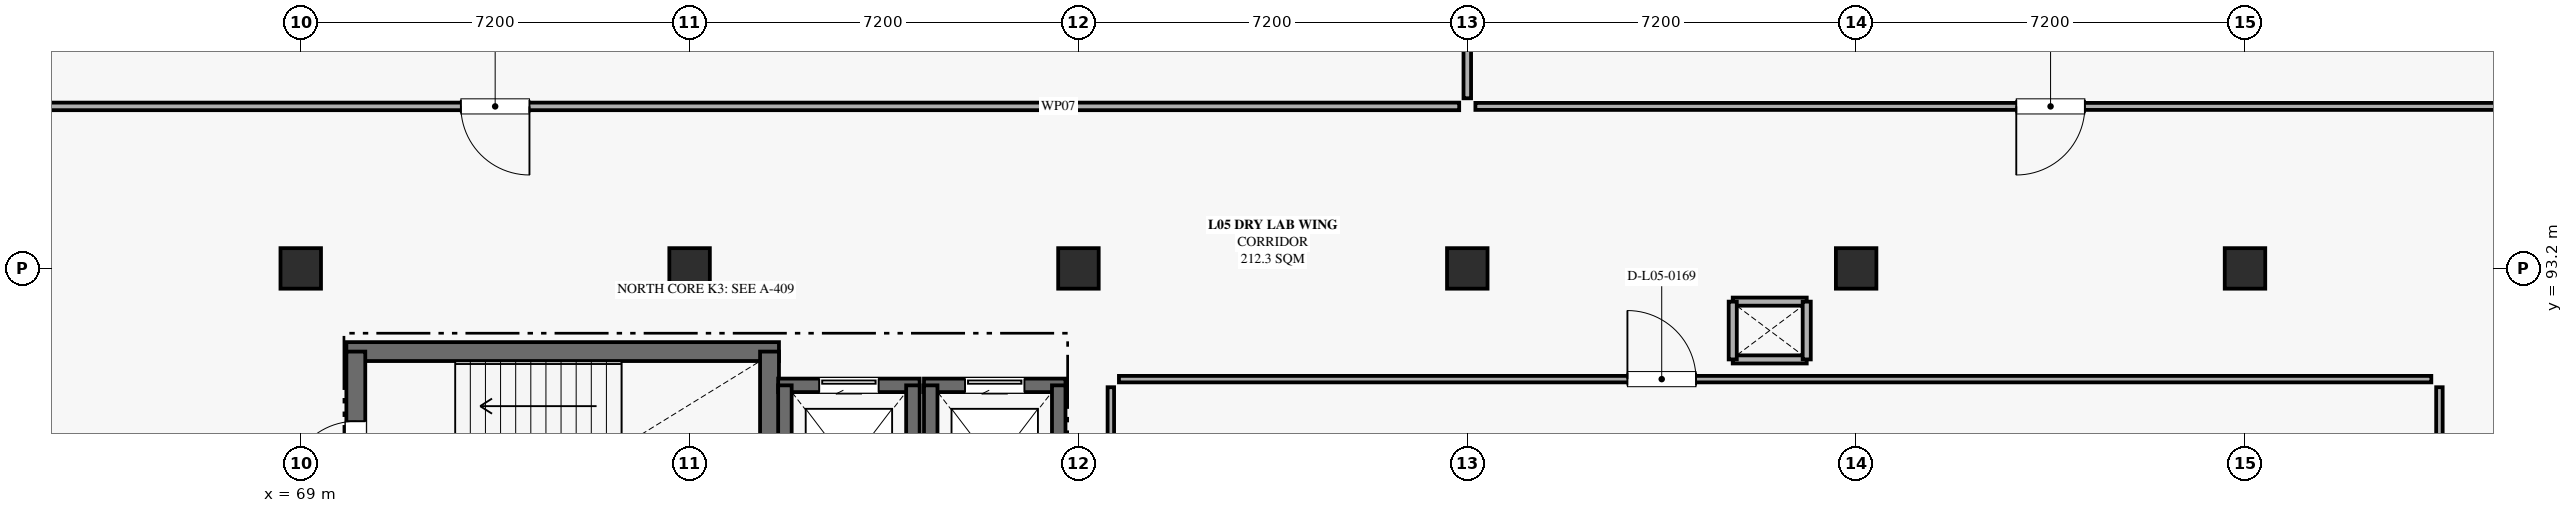
"""IFC4 building model, lengths in metres.
Left out: names, types, materials, properties, quantities, classifications, styles, units other than length and angle.
Written with IfcOpenShell. Run it as: python <this file> out.ifc"""

import sys

from ifc_helpers import new_model, si_unit, direction, frame, frame_2d, origin, origin_2d, place, context, subcontext, project, spatial, rectangle, extrude, element, fill, save


model = new_model("IFC4")
c1 = context("Model", 3, precision=1e-05, world=origin(), true_north=direction((0.0, 1.0)))
c2 = subcontext(c1, "Body", "Model", "MODEL_VIEW")
j1 = project(units=[si_unit("LENGTHUNIT", "METRE"), si_unit("PLANEANGLEUNIT", "RADIAN")], contexts=[c1])
p1 = place(None, origin())
s1 = spatial("IfcSite", under=j1, at=p1, CompositionType="ELEMENT")
p2 = place(p1, origin())
s2 = spatial("IfcBuilding", under=s1, at=p2, CompositionType="ELEMENT")
p3 = place(p2, frame((0.0, 0.0, 24.3)))
s3 = spatial("IfcBuildingStorey", under=s2, at=p3, CompositionType="ELEMENT", Elevation=24.3)
for number, where, z_axis, x_axis in (
    (1, (69.0, 93.2, 0.0), (0.0, 0.0, 1.0), (1.0, 0.0, 0.0)),
    (2, (76.2, 93.2, 0.0), (0.0, 0.0, 1.0), (1.0, 0.0, 0.0)),
    (3, (83.4, 93.2, 0.0), (0.0, 0.0, 1.0), (1.0, 0.0, 0.0)),
    (4, (90.6, 93.2, 0.0), (0.0, 0.0, 1.0), (1.0, 0.0, 0.0)),
    (5, (97.8, 93.2, 0.0), (0.0, 0.0, 1.0), (1.0, 0.0, 0.0)),
    (6, (105.0, 93.2, 0.0), (0.0, 0.0, 1.0), (1.0, 0.0, 0.0)),
):
    element("IfcColumn", number, at=place(p3, frame(where, z_axis=z_axis, x_axis=x_axis)), inside=s3, PredefinedType="COLUMN", context=c2, shape_type="SweptSolid", body=[
        extrude(rectangle(XDim=0.75, YDim=0.75, at=origin_2d()), origin(), (0.0, 0.0, 1.0), 4.5),
    ])
p4 = place(p3, frame((69.845, 91.66, 0.0), z_axis=(0.0, 0.0, 1.0), x_axis=(1.0, 0.0, 0.0)))
e7 = element("IfcWall", 7, at=p4, inside=s3, PredefinedType="SHEAR", context=c2, shape_type="SweptSolid", body=[
    extrude(rectangle(XDim=8.01, YDim=0.35, at=frame_2d((4.005, 0.0))), origin(), (0.0, 0.0, 1.0), 4.23),
])
p5 = place(p3, frame((70.02, 87.82, 0.0), z_axis=(0.0, 0.0, 1.0), x_axis=(0.0, 1.0, 0.0)))
e8 = element("IfcWall", 8, at=p5, inside=s3, PredefinedType="SHEAR", context=c2, shape_type="SweptSolid", body=[
    extrude(rectangle(XDim=3.84, YDim=0.35, at=frame_2d((1.92, 0.0))), origin(), (0.0, 0.0, 1.0), 4.23),
])
p6 = place(p5, frame((1.29, 0.0, 0.0)))
e9 = element("IfcOpeningElement", 9, at=p6, cuts=e8, PredefinedType="OPENING", context=c2, shape_type="SweptSolid", body=[
    extrude(rectangle(XDim=1.26, YDim=2.18, at=frame_2d((0.63, 1.09))), frame((0.0, 0.185, 0.0), z_axis=(0.0, -1.0, 0.0), x_axis=(1.0, 0.0, 0.0)), (0.0, 0.0, 1.0), 0.37),
])
p7 = place(p3, frame((77.68, 91.66, 0.0), z_axis=(0.0, 0.0, 1.0), x_axis=(0.0, -1.0, 0.0)))
e10 = element("IfcWall", 10, at=p7, inside=s3, PredefinedType="SHEAR", context=c2, shape_type="SweptSolid", body=[
    extrude(rectangle(XDim=3.84, YDim=0.35, at=frame_2d((1.92, 0.0))), origin(), (0.0, 0.0, 1.0), 4.23),
])
for number, where, z_axis, x_axis in (
    (11, (96.885, 91.515, 0.0), (0.0, 0.0, 1.0), (-1.0, 0.0, 0.0)),
    (12, (95.515, 92.585, 0.0), (0.0, 0.0, 1.0), (1.0, 0.0, 0.0)),
):
    element("IfcWall", number, at=place(p3, frame(where, z_axis=z_axis, x_axis=x_axis)), inside=s3, PredefinedType="PARTITIONING", context=c2, shape_type="SweptSolid", body=[
        extrude(rectangle(XDim=1.37, YDim=0.15, at=frame_2d((0.685, 0.0))), origin(), (0.0, 0.0, 1.0), 2.98),
    ])
for number, where, z_axis, x_axis in (
    (13, (95.515, 91.515, 0.0), (0.0, 0.0, 1.0), (0.0, 1.0, 0.0)),
    (14, (96.885, 92.585, 0.0), (0.0, 0.0, 1.0), (0.0, -1.0, 0.0)),
):
    element("IfcWall", number, at=place(p3, frame(where, z_axis=z_axis, x_axis=x_axis)), inside=s3, PredefinedType="PARTITIONING", context=c2, shape_type="SweptSolid", body=[
        extrude(rectangle(XDim=1.07, YDim=0.15, at=frame_2d((0.535, 0.0))), origin(), (0.0, 0.0, 1.0), 2.98),
    ])
p8 = place(p3, frame((77.84, 91.035, 0.0), z_axis=(0.0, 0.0, 1.0), x_axis=(1.0, 0.0, 0.0)))
e15 = element("IfcWall", 15, at=p8, inside=s3, PredefinedType="SHEAR", context=c2, shape_type="SweptSolid", body=[
    extrude(rectangle(XDim=2.62, YDim=0.25, at=frame_2d((1.31, 0.0))), origin(), (0.0, 0.0, 1.0), 4.23),
])
p9 = place(p8, frame((0.76, 0.0, 0.0)))
e16 = element("IfcOpeningElement", 16, at=p9, cuts=e15, PredefinedType="OPENING", context=c2, shape_type="SweptSolid", body=[
    extrude(rectangle(XDim=1.1, YDim=2.2, at=frame_2d((0.55, 1.1))), frame((0.0, 0.135, 0.0), z_axis=(0.0, -1.0, 0.0), x_axis=(1.0, 0.0, 0.0)), (0.0, 0.0, 1.0), 0.27),
])
for number, where, z_axis, x_axis in (
    (17, (77.965, 88.065, 0.0), (0.0, 0.0, 1.0), (0.0, 1.0, 0.0)),
    (18, (80.335, 91.035, 0.0), (0.0, 0.0, 1.0), (0.0, -1.0, 0.0)),
):
    element("IfcWall", number, at=place(p3, frame(where, z_axis=z_axis, x_axis=x_axis)), inside=s3, PredefinedType="SHEAR", context=c2, shape_type="SweptSolid", body=[
        extrude(rectangle(XDim=2.97, YDim=0.25, at=frame_2d((1.485, 0.0))), origin(), (0.0, 0.0, 1.0), 4.23),
    ])
p10 = place(p3, frame((80.54, 91.035, 0.0), z_axis=(0.0, 0.0, 1.0), x_axis=(1.0, 0.0, 0.0)))
e19 = element("IfcWall", 19, at=p10, inside=s3, PredefinedType="SHEAR", context=c2, shape_type="SweptSolid", body=[
    extrude(rectangle(XDim=2.62, YDim=0.25, at=frame_2d((1.31, 0.0))), origin(), (0.0, 0.0, 1.0), 4.23),
])
p11 = place(p10, frame((0.76, 0.0, 0.0)))
e20 = element("IfcOpeningElement", 20, at=p11, cuts=e19, PredefinedType="OPENING", context=c2, shape_type="SweptSolid", body=[
    extrude(rectangle(XDim=1.1, YDim=2.2, at=frame_2d((0.55, 1.1))), frame((0.0, 0.135, 0.0), z_axis=(0.0, -1.0, 0.0), x_axis=(1.0, 0.0, 0.0)), (0.0, 0.0, 1.0), 0.27),
])
for number, where, z_axis, x_axis in (
    (21, (80.665, 88.065, 0.0), (0.0, 0.0, 1.0), (0.0, 1.0, 0.0)),
    (22, (83.035, 91.035, 0.0), (0.0, 0.0, 1.0), (0.0, -1.0, 0.0)),
):
    element("IfcWall", number, at=place(p3, frame(where, z_axis=z_axis, x_axis=x_axis)), inside=s3, PredefinedType="SHEAR", context=c2, shape_type="SweptSolid", body=[
        extrude(rectangle(XDim=2.97, YDim=0.25, at=frame_2d((1.485, 0.0))), origin(), (0.0, 0.0, 1.0), 4.23),
    ])
p12 = place(p3, frame((90.45, 96.2, 0.0), z_axis=(0.0, 0.0, 1.0), x_axis=(-1.0, 0.0, 0.0)))
e23 = element("IfcWall", 23, at=p12, inside=s3, PredefinedType="PARTITIONING", context=c2, shape_type="SweptSolid", body=[
    extrude(rectangle(XDim=28.3, YDim=0.14, at=frame_2d((14.15, 0.0))), origin(), (0.0, 0.0, 1.0), 2.98),
])
p13 = place(p12, frame((17.215, 0.0, 0.0)))
e24 = element("IfcOpeningElement", 24, at=p13, cuts=e23, PredefinedType="OPENING", context=c2, shape_type="SweptSolid", body=[
    extrude(rectangle(XDim=1.27, YDim=2.05, at=frame_2d((0.635, 1.025))), frame((0.0, 0.08, 0.0), z_axis=(0.0, -1.0, 0.0), x_axis=(1.0, 0.0, 0.0)), (0.0, 0.0, 1.0), 0.16),
])
p14 = place(p3, frame((90.6, 107.45, 0.0), z_axis=(0.0, 0.0, 1.0), x_axis=(0.0, -1.0, 0.0)))
e25 = element("IfcWall", 25, at=p14, inside=s3, PredefinedType="PARTITIONING", context=c2, shape_type="SweptSolid", body=[
    extrude(rectangle(XDim=11.1, YDim=0.14, at=frame_2d((5.55, 0.0))), origin(), (0.0, 0.0, 1.0), 2.98),
])
p15 = place(p3, frame((111.85, 96.2, 0.0), z_axis=(0.0, 0.0, 1.0), x_axis=(-1.0, 0.0, 0.0)))
e26 = element("IfcWall", 26, at=p15, inside=s3, PredefinedType="PARTITIONING", context=c2, shape_type="SweptSolid", body=[
    extrude(rectangle(XDim=21.1, YDim=0.13, at=frame_2d((10.55, 0.0))), origin(), (0.0, 0.0, 1.0), 2.98),
])
p16 = place(p15, frame((9.815, 0.0, 0.0)))
e27 = element("IfcOpeningElement", 27, at=p16, cuts=e26, PredefinedType="OPENING", context=c2, shape_type="SweptSolid", body=[
    extrude(rectangle(XDim=1.27, YDim=2.1, at=frame_2d((0.635, 1.05))), frame((0.0, 0.075, 0.0), z_axis=(0.0, -1.0, 0.0), x_axis=(1.0, 0.0, 0.0)), (0.0, 0.0, 1.0), 0.15),
])
p17 = place(p3, frame((84.15, 91.15, 0.0), z_axis=(0.0, 0.0, 1.0), x_axis=(1.0, 0.0, 0.0)))
e28 = element("IfcWall", 28, at=p17, inside=s3, PredefinedType="PARTITIONING", context=c2, shape_type="SweptSolid", body=[
    extrude(rectangle(XDim=24.3, YDim=0.12, at=frame_2d((12.15, 0.0))), origin(), (0.0, 0.0, 1.0), 2.98),
])
p18 = place(p17, frame((9.415, 0.0, 0.0)))
e29 = element("IfcOpeningElement", 29, at=p18, cuts=e28, PredefinedType="OPENING", context=c2, shape_type="SweptSolid", body=[
    extrude(rectangle(XDim=1.27, YDim=2.16, at=frame_2d((0.635, 1.08))), frame((0.0, 0.07, 0.0), z_axis=(0.0, -1.0, 0.0), x_axis=(1.0, 0.0, 0.0)), (0.0, 0.0, 1.0), 0.14),
])
for number, where, z_axis, x_axis in (
    (30, (84.0, 86.35, 0.0), (0.0, 0.0, 1.0), (0.0, 1.0, 0.0)),
    (31, (108.6, 91.0, 0.0), (0.0, 0.0, 1.0), (0.0, -1.0, 0.0)),
):
    element("IfcWall", number, at=place(p3, frame(where, z_axis=z_axis, x_axis=x_axis)), inside=s3, PredefinedType="PARTITIONING", context=c2, shape_type="SweptSolid", body=[
        extrude(rectangle(XDim=4.65, YDim=0.12, at=frame_2d((2.325, 0.0))), origin(), (0.0, 0.0, 1.0), 2.98),
    ])
p19 = place(p6, origin())
e32 = element("IfcDoor", 32, at=p19, inside=s3, OperationType="SINGLE_SWING_LEFT", PredefinedType="DOOR", context=c2, shape_type="SweptSolid", body=[
    extrude(rectangle(XDim=1.26, YDim=2.18, at=frame_2d((0.63, 1.09))), frame((0.0, 0.025, 0.0), z_axis=(0.0, -1.0, 0.0), x_axis=(1.0, 0.0, 0.0)), (0.0, 0.0, 1.0), 0.05),
])
fill(e9, e32)
p20 = place(p9, origin())
e33 = element("IfcDoor", 33, at=p20, inside=s3, OperationType="SLIDING_TO_LEFT", PredefinedType="DOOR", context=c2, shape_type="SweptSolid", body=[
    extrude(rectangle(XDim=1.1, YDim=2.2, at=frame_2d((0.55, 1.1))), frame((0.0, 0.025, 0.0), z_axis=(0.0, -1.0, 0.0), x_axis=(1.0, 0.0, 0.0)), (0.0, 0.0, 1.0), 0.05),
])
fill(e16, e33)
p21 = place(p11, origin())
e34 = element("IfcDoor", 34, at=p21, inside=s3, OperationType="SLIDING_TO_LEFT", PredefinedType="DOOR", context=c2, shape_type="SweptSolid", body=[
    extrude(rectangle(XDim=1.1, YDim=2.2, at=frame_2d((0.55, 1.1))), frame((0.0, 0.025, 0.0), z_axis=(0.0, -1.0, 0.0), x_axis=(1.0, 0.0, 0.0)), (0.0, 0.0, 1.0), 0.05),
])
fill(e20, e34)
p22 = place(p13, origin())
e35 = element("IfcDoor", 35, at=p22, inside=s3, OperationType="SINGLE_SWING_LEFT", PredefinedType="DOOR", context=c2, shape_type="SweptSolid", body=[
    extrude(rectangle(XDim=1.27, YDim=2.05, at=frame_2d((0.635, 1.025))), frame((0.0, 0.025, 0.0), z_axis=(0.0, -1.0, 0.0), x_axis=(1.0, 0.0, 0.0)), (0.0, 0.0, 1.0), 0.05),
])
fill(e24, e35)
p23 = place(p16, origin())
e36 = element("IfcDoor", 36, at=p23, inside=s3, OperationType="SINGLE_SWING_RIGHT", PredefinedType="DOOR", context=c2, shape_type="SweptSolid", body=[
    extrude(rectangle(XDim=1.27, YDim=2.1, at=frame_2d((0.635, 1.05))), frame((0.0, 0.025, 0.0), z_axis=(0.0, -1.0, 0.0), x_axis=(1.0, 0.0, 0.0)), (0.0, 0.0, 1.0), 0.05),
])
fill(e27, e36)
p24 = place(p18, origin())
e37 = element("IfcDoor", 37, at=p24, inside=s3, OperationType="SINGLE_SWING_LEFT", PredefinedType="DOOR", context=c2, shape_type="SweptSolid", body=[
    extrude(rectangle(XDim=1.27, YDim=2.16, at=frame_2d((0.635, 1.08))), frame((0.0, 0.025, 0.0), z_axis=(0.0, -1.0, 0.0), x_axis=(1.0, 0.0, 0.0)), (0.0, 0.0, 1.0), 0.05),
])
fill(e29, e37)
save(model, sys.argv[1])
